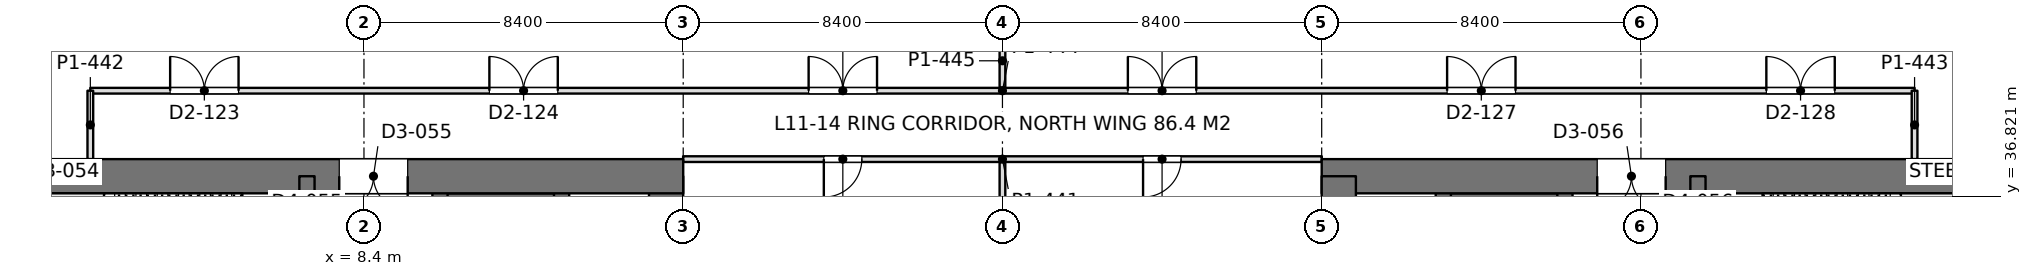
"""IFC4 building model, lengths in metres.
Left out: names, types, materials, properties, quantities, classifications, styles, units other than length and angle.
Written with IfcOpenShell. Run it as: python <this file> out.ifc"""

import sys

from ifc_helpers import new_model, si_unit, direction, frame, frame_2d, origin, place, context, subcontext, project, spatial, rectangle, extrude, element, fill, save


model = new_model("IFC4")
c1 = context("Model", 3, precision=1e-05, world=origin(), true_north=direction((0.0, 1.0)))
c2 = subcontext(c1, "Body", "Model", "MODEL_VIEW")
j1 = project(units=[si_unit("LENGTHUNIT", "METRE"), si_unit("PLANEANGLEUNIT", "RADIAN")], contexts=[c1])
p1 = place(None, origin())
s1 = spatial("IfcSite", under=j1, at=p1, CompositionType="ELEMENT")
p2 = place(p1, origin())
s2 = spatial("IfcBuilding", under=s1, at=p2, CompositionType="ELEMENT")
p3 = place(p2, frame((0.0, 0.0, 50.4)))
s3 = spatial("IfcBuildingStorey", under=s2, at=p3, CompositionType="ELEMENT", Elevation=50.4)
p4 = place(p3, frame((-1.2, 37.35, 0.0), z_axis=(0.0, 0.0, 1.0), x_axis=(1.0, 0.0, 0.0)))
e1 = element("IfcWall", 1, at=p4, inside=s3, PredefinedType="SHEAR", context=c2, shape_type="SweptSolid", body=[
    extrude(rectangle(XDim=18.0, YDim=0.9, at=frame_2d((9.0, 0.0))), origin(), (0.0, 0.0, 1.0), 4.5),
])
p5 = place(p4, frame((8.95, 0.0, 0.0)))
e2 = element("IfcOpeningElement", 2, at=p5, cuts=e1, PredefinedType="OPENING", context=c2, shape_type="SweptSolid", body=[
    extrude(rectangle(XDim=1.8, YDim=2.4, at=frame_2d((0.9, 1.2))), frame((0.0, 0.46, 0.0), z_axis=(0.0, -1.0, 0.0), x_axis=(1.0, 0.0, 0.0)), (0.0, 0.0, 1.0), 0.92),
])
p6 = place(p3, frame((16.35, 13.05, 0.0), z_axis=(0.0, 0.0, 1.0), x_axis=(0.0, 1.0, 0.0)))
e3 = element("IfcWall", 3, at=p6, inside=s3, PredefinedType="SHEAR", context=c2, shape_type="SweptSolid", body=[
    extrude(rectangle(XDim=24.3, YDim=0.9, at=frame_2d((12.15, 0.0))), origin(), (0.0, 0.0, 1.0), 4.5),
])
p7 = place(p3, frame((6.9, 13.05, 0.0), z_axis=(0.0, 0.0, 1.0), x_axis=(0.0, 1.0, 0.0)))
e4 = element("IfcWall", 4, at=p7, inside=s3, PredefinedType="SHEAR", context=c2, shape_type="SweptSolid", body=[
    extrude(rectangle(XDim=24.3, YDim=0.4, at=frame_2d((12.15, 0.0))), origin(), (0.0, 0.0, 1.0), 4.5),
])
p8 = place(p7, frame((1.3, 0.0, 0.0)))
e5 = element("IfcOpeningElement", 5, at=p8, cuts=e4, PredefinedType="OPENING", context=c2, shape_type="SweptSolid", body=[
    extrude(rectangle(XDim=1.0, YDim=2.2, at=frame_2d((0.5, 1.1))), frame((0.0, 0.21, 0.0), z_axis=(0.0, -1.0, 0.0), x_axis=(1.0, 0.0, 0.0)), (0.0, 0.0, 1.0), 0.42),
])
p9 = place(p7, frame((22.0, 0.0, 0.0)))
e6 = element("IfcOpeningElement", 6, at=p9, cuts=e4, PredefinedType="OPENING", context=c2, shape_type="SweptSolid", body=[
    extrude(rectangle(XDim=1.0, YDim=2.2, at=frame_2d((0.5, 1.1))), frame((0.0, 0.21, 0.0), z_axis=(0.0, -1.0, 0.0), x_axis=(1.0, 0.0, 0.0)), (0.0, 0.0, 1.0), 0.42),
])
p10 = place(p7, frame((5.55, 0.0, 0.0)))
e7 = element("IfcOpeningElement", 7, at=p10, cuts=e4, PredefinedType="OPENING", context=c2, shape_type="SweptSolid", body=[
    extrude(rectangle(XDim=1.0, YDim=2.2, at=frame_2d((0.5, 1.1))), frame((0.0, 0.21, 0.0), z_axis=(0.0, -1.0, 0.0), x_axis=(1.0, 0.0, 0.0)), (0.0, 0.0, 1.0), 0.42),
])
p11 = place(p7, frame((9.55, 0.0, 0.0)))
e8 = element("IfcOpeningElement", 8, at=p11, cuts=e4, PredefinedType="OPENING", context=c2, shape_type="SweptSolid", body=[
    extrude(rectangle(XDim=1.0, YDim=2.2, at=frame_2d((0.5, 1.1))), frame((0.0, 0.21, 0.0), z_axis=(0.0, -1.0, 0.0), x_axis=(1.0, 0.0, 0.0)), (0.0, 0.0, 1.0), 0.42),
])
p12 = place(p7, frame((12.8, 0.0, 0.0)))
e9 = element("IfcOpeningElement", 9, at=p12, cuts=e4, PredefinedType="OPENING", context=c2, shape_type="SweptSolid", body=[
    extrude(rectangle(XDim=1.1, YDim=2.2, at=frame_2d((0.55, 1.1))), frame((0.0, 0.21, 0.0), z_axis=(0.0, -1.0, 0.0), x_axis=(1.0, 0.0, 0.0)), (0.0, 0.0, 1.0), 0.42),
])
p13 = place(p7, frame((15.538, 0.0, 0.0)))
e10 = element("IfcOpeningElement", 10, at=p13, cuts=e4, PredefinedType="OPENING", context=c2, shape_type="SweptSolid", body=[
    extrude(rectangle(XDim=1.1, YDim=2.2, at=frame_2d((0.55, 1.1))), frame((0.0, 0.21, 0.0), z_axis=(0.0, -1.0, 0.0), x_axis=(1.0, 0.0, 0.0)), (0.0, 0.0, 1.0), 0.42),
])
p14 = place(p7, frame((18.262, 0.0, 0.0)))
e11 = element("IfcOpeningElement", 11, at=p14, cuts=e4, PredefinedType="OPENING", context=c2, shape_type="SweptSolid", body=[
    extrude(rectangle(XDim=1.1, YDim=2.2, at=frame_2d((0.55, 1.1))), frame((0.0, 0.21, 0.0), z_axis=(0.0, -1.0, 0.0), x_axis=(1.0, 0.0, 0.0)), (0.0, 0.0, 1.0), 0.42),
])
p15 = place(p3, frame((10.4, 13.05, 0.0), z_axis=(0.0, 0.0, 1.0), x_axis=(0.0, 1.0, 0.0)))
e12 = element("IfcWall", 12, at=p15, inside=s3, PredefinedType="SHEAR", context=c2, shape_type="SweptSolid", body=[
    extrude(rectangle(XDim=24.3, YDim=0.4, at=frame_2d((12.15, 0.0))), origin(), (0.0, 0.0, 1.0), 4.5),
])
p16 = place(p15, frame((1.5, 0.0, 0.0)))
e13 = element("IfcOpeningElement", 13, at=p16, cuts=e12, PredefinedType="OPENING", context=c2, shape_type="SweptSolid", body=[
    extrude(rectangle(XDim=1.1, YDim=2.2, at=frame_2d((0.55, 1.1))), frame((0.0, 0.21, 0.0), z_axis=(0.0, -1.0, 0.0), x_axis=(1.0, 0.0, 0.0)), (0.0, 0.0, 1.0), 0.42),
])
p17 = place(p15, frame((4.35, 0.0, 0.0)))
e14 = element("IfcOpeningElement", 14, at=p17, cuts=e12, PredefinedType="OPENING", context=c2, shape_type="SweptSolid", body=[
    extrude(rectangle(XDim=1.1, YDim=2.2, at=frame_2d((0.55, 1.1))), frame((0.0, 0.21, 0.0), z_axis=(0.0, -1.0, 0.0), x_axis=(1.0, 0.0, 0.0)), (0.0, 0.0, 1.0), 0.42),
])
p18 = place(p15, frame((7.2, 0.0, 0.0)))
e15 = element("IfcOpeningElement", 15, at=p18, cuts=e12, PredefinedType="OPENING", context=c2, shape_type="SweptSolid", body=[
    extrude(rectangle(XDim=1.1, YDim=2.2, at=frame_2d((0.55, 1.1))), frame((0.0, 0.21, 0.0), z_axis=(0.0, -1.0, 0.0), x_axis=(1.0, 0.0, 0.0)), (0.0, 0.0, 1.0), 0.42),
])
p19 = place(p15, frame((21.45, 0.0, 0.0)))
e16 = element("IfcOpeningElement", 16, at=p19, cuts=e12, PredefinedType="OPENING", context=c2, shape_type="SweptSolid", body=[
    extrude(rectangle(XDim=1.1, YDim=2.2, at=frame_2d((0.55, 1.1))), frame((0.0, 0.21, 0.0), z_axis=(0.0, -1.0, 0.0), x_axis=(1.0, 0.0, 0.0)), (0.0, 0.0, 1.0), 0.42),
])
p20 = place(p3, frame((13.6, 13.05, 0.0), z_axis=(0.0, 0.0, 1.0), x_axis=(0.0, 1.0, 0.0)))
e17 = element("IfcWall", 17, at=p20, inside=s3, PredefinedType="SHEAR", context=c2, shape_type="SweptSolid", body=[
    extrude(rectangle(XDim=24.3, YDim=0.4, at=frame_2d((12.15, 0.0))), origin(), (0.0, 0.0, 1.0), 4.5),
])
p21 = place(p3, frame((10.4, 36.625, 0.0), z_axis=(0.0, 0.0, 1.0), x_axis=(1.0, 0.0, 0.0)))
e18 = element("IfcWall", 18, at=p21, inside=s3, PredefinedType="SHEAR", context=c2, shape_type="SweptSolid", body=[
    extrude(rectangle(XDim=3.2, YDim=0.55, at=frame_2d((1.6, 0.0))), origin(), (0.0, 0.0, 1.0), 4.5),
])
p22 = place(p3, frame((33.6, 37.35, 0.0), z_axis=(0.0, 0.0, 1.0), x_axis=(1.0, 0.0, 0.0)))
e19 = element("IfcWall", 19, at=p22, inside=s3, PredefinedType="SHEAR", context=c2, shape_type="SweptSolid", body=[
    extrude(rectangle(XDim=18.0, YDim=0.9, at=frame_2d((9.0, 0.0))), origin(), (0.0, 0.0, 1.0), 4.5),
])
p23 = place(p22, frame((7.25, 0.0, 0.0)))
e20 = element("IfcOpeningElement", 20, at=p23, cuts=e19, PredefinedType="OPENING", context=c2, shape_type="SweptSolid", body=[
    extrude(rectangle(XDim=1.8, YDim=2.4, at=frame_2d((0.9, 1.2))), frame((0.0, 0.46, 0.0), z_axis=(0.0, -1.0, 0.0), x_axis=(1.0, 0.0, 0.0)), (0.0, 0.0, 1.0), 0.92),
])
p24 = place(p3, frame((34.05, 13.05, 0.0), z_axis=(0.0, 0.0, 1.0), x_axis=(0.0, 1.0, 0.0)))
e21 = element("IfcWall", 21, at=p24, inside=s3, PredefinedType="SHEAR", context=c2, shape_type="SweptSolid", body=[
    extrude(rectangle(XDim=24.3, YDim=0.9, at=frame_2d((12.15, 0.0))), origin(), (0.0, 0.0, 1.0), 4.5),
])
p25 = place(p3, frame((43.5, 13.05, 0.0), z_axis=(0.0, 0.0, 1.0), x_axis=(0.0, 1.0, 0.0)))
e22 = element("IfcWall", 22, at=p25, inside=s3, PredefinedType="SHEAR", context=c2, shape_type="SweptSolid", body=[
    extrude(rectangle(XDim=24.3, YDim=0.4, at=frame_2d((12.15, 0.0))), origin(), (0.0, 0.0, 1.0), 4.5),
])
p26 = place(p25, frame((1.3, 0.0, 0.0)))
e23 = element("IfcOpeningElement", 23, at=p26, cuts=e22, PredefinedType="OPENING", context=c2, shape_type="SweptSolid", body=[
    extrude(rectangle(XDim=1.0, YDim=2.2, at=frame_2d((0.5, 1.1))), frame((0.0, 0.21, 0.0), z_axis=(0.0, -1.0, 0.0), x_axis=(1.0, 0.0, 0.0)), (0.0, 0.0, 1.0), 0.42),
])
p27 = place(p25, frame((22.0, 0.0, 0.0)))
e24 = element("IfcOpeningElement", 24, at=p27, cuts=e22, PredefinedType="OPENING", context=c2, shape_type="SweptSolid", body=[
    extrude(rectangle(XDim=1.0, YDim=2.2, at=frame_2d((0.5, 1.1))), frame((0.0, 0.21, 0.0), z_axis=(0.0, -1.0, 0.0), x_axis=(1.0, 0.0, 0.0)), (0.0, 0.0, 1.0), 0.42),
])
p28 = place(p25, frame((5.55, 0.0, 0.0)))
e25 = element("IfcOpeningElement", 25, at=p28, cuts=e22, PredefinedType="OPENING", context=c2, shape_type="SweptSolid", body=[
    extrude(rectangle(XDim=1.0, YDim=2.2, at=frame_2d((0.5, 1.1))), frame((0.0, 0.21, 0.0), z_axis=(0.0, -1.0, 0.0), x_axis=(1.0, 0.0, 0.0)), (0.0, 0.0, 1.0), 0.42),
])
p29 = place(p25, frame((9.55, 0.0, 0.0)))
e26 = element("IfcOpeningElement", 26, at=p29, cuts=e22, PredefinedType="OPENING", context=c2, shape_type="SweptSolid", body=[
    extrude(rectangle(XDim=1.0, YDim=2.2, at=frame_2d((0.5, 1.1))), frame((0.0, 0.21, 0.0), z_axis=(0.0, -1.0, 0.0), x_axis=(1.0, 0.0, 0.0)), (0.0, 0.0, 1.0), 0.42),
])
p30 = place(p25, frame((12.8, 0.0, 0.0)))
e27 = element("IfcOpeningElement", 27, at=p30, cuts=e22, PredefinedType="OPENING", context=c2, shape_type="SweptSolid", body=[
    extrude(rectangle(XDim=1.1, YDim=2.2, at=frame_2d((0.55, 1.1))), frame((0.0, 0.21, 0.0), z_axis=(0.0, -1.0, 0.0), x_axis=(1.0, 0.0, 0.0)), (0.0, 0.0, 1.0), 0.42),
])
p31 = place(p25, frame((15.538, 0.0, 0.0)))
e28 = element("IfcOpeningElement", 28, at=p31, cuts=e22, PredefinedType="OPENING", context=c2, shape_type="SweptSolid", body=[
    extrude(rectangle(XDim=1.1, YDim=2.2, at=frame_2d((0.55, 1.1))), frame((0.0, 0.21, 0.0), z_axis=(0.0, -1.0, 0.0), x_axis=(1.0, 0.0, 0.0)), (0.0, 0.0, 1.0), 0.42),
])
p32 = place(p25, frame((18.262, 0.0, 0.0)))
e29 = element("IfcOpeningElement", 29, at=p32, cuts=e22, PredefinedType="OPENING", context=c2, shape_type="SweptSolid", body=[
    extrude(rectangle(XDim=1.1, YDim=2.2, at=frame_2d((0.55, 1.1))), frame((0.0, 0.21, 0.0), z_axis=(0.0, -1.0, 0.0), x_axis=(1.0, 0.0, 0.0)), (0.0, 0.0, 1.0), 0.42),
])
p33 = place(p3, frame((40.0, 13.05, 0.0), z_axis=(0.0, 0.0, 1.0), x_axis=(0.0, 1.0, 0.0)))
e30 = element("IfcWall", 30, at=p33, inside=s3, PredefinedType="SHEAR", context=c2, shape_type="SweptSolid", body=[
    extrude(rectangle(XDim=24.3, YDim=0.4, at=frame_2d((12.15, 0.0))), origin(), (0.0, 0.0, 1.0), 4.5),
])
p34 = place(p33, frame((1.5, 0.0, 0.0)))
e31 = element("IfcOpeningElement", 31, at=p34, cuts=e30, PredefinedType="OPENING", context=c2, shape_type="SweptSolid", body=[
    extrude(rectangle(XDim=1.1, YDim=2.2, at=frame_2d((0.55, 1.1))), frame((0.0, 0.21, 0.0), z_axis=(0.0, -1.0, 0.0), x_axis=(1.0, 0.0, 0.0)), (0.0, 0.0, 1.0), 0.42),
])
p35 = place(p33, frame((4.35, 0.0, 0.0)))
e32 = element("IfcOpeningElement", 32, at=p35, cuts=e30, PredefinedType="OPENING", context=c2, shape_type="SweptSolid", body=[
    extrude(rectangle(XDim=1.1, YDim=2.2, at=frame_2d((0.55, 1.1))), frame((0.0, 0.21, 0.0), z_axis=(0.0, -1.0, 0.0), x_axis=(1.0, 0.0, 0.0)), (0.0, 0.0, 1.0), 0.42),
])
p36 = place(p33, frame((7.2, 0.0, 0.0)))
e33 = element("IfcOpeningElement", 33, at=p36, cuts=e30, PredefinedType="OPENING", context=c2, shape_type="SweptSolid", body=[
    extrude(rectangle(XDim=1.1, YDim=2.2, at=frame_2d((0.55, 1.1))), frame((0.0, 0.21, 0.0), z_axis=(0.0, -1.0, 0.0), x_axis=(1.0, 0.0, 0.0)), (0.0, 0.0, 1.0), 0.42),
])
p37 = place(p33, frame((21.45, 0.0, 0.0)))
e34 = element("IfcOpeningElement", 34, at=p37, cuts=e30, PredefinedType="OPENING", context=c2, shape_type="SweptSolid", body=[
    extrude(rectangle(XDim=1.1, YDim=2.2, at=frame_2d((0.55, 1.1))), frame((0.0, 0.21, 0.0), z_axis=(0.0, -1.0, 0.0), x_axis=(1.0, 0.0, 0.0)), (0.0, 0.0, 1.0), 0.42),
])
p38 = place(p3, frame((36.8, 13.05, 0.0), z_axis=(0.0, 0.0, 1.0), x_axis=(0.0, 1.0, 0.0)))
e35 = element("IfcWall", 35, at=p38, inside=s3, PredefinedType="SHEAR", context=c2, shape_type="SweptSolid", body=[
    extrude(rectangle(XDim=24.3, YDim=0.4, at=frame_2d((12.15, 0.0))), origin(), (0.0, 0.0, 1.0), 4.5),
])
p39 = place(p3, frame((40.0, 36.625, 0.0), z_axis=(0.0, 0.0, 1.0), x_axis=(-1.0, 0.0, 0.0)))
e36 = element("IfcWall", 36, at=p39, inside=s3, PredefinedType="SHEAR", context=c2, shape_type="SweptSolid", body=[
    extrude(rectangle(XDim=3.2, YDim=0.55, at=frame_2d((1.6, 0.0))), origin(), (0.0, 0.0, 1.0), 4.5),
])
p40 = place(p3, frame((25.2, 39.674, 0.0), z_axis=(0.0, 0.0, 1.0), x_axis=(0.0, 1.0, 0.0)))
e37 = element("IfcWall", 37, at=p40, inside=s3, PredefinedType="PARTITIONING", context=c2, shape_type="SweptSolid", body=[
    extrude(rectangle(XDim=1.427, YDim=0.15, at=frame_2d((0.713, 0.0))), origin(), (0.0, 0.0, 1.0), 3.74),
])
p41 = place(p3, frame((1.2, 39.6, 0.0), z_axis=(0.0, 0.0, 1.0), x_axis=(1.0, 0.0, 0.0)))
e38 = element("IfcWall", 38, at=p41, inside=s3, PredefinedType="PARTITIONING", context=c2, shape_type="SweptSolid", body=[
    extrude(rectangle(XDim=48.0, YDim=0.15, at=frame_2d((24.0, 0.0))), origin(), (0.0, 0.0, 1.0), 3.74),
])
p42 = place(p41, frame((2.1, 0.0, 0.0)))
e39 = element("IfcOpeningElement", 39, at=p42, cuts=e38, PredefinedType="OPENING", context=c2, shape_type="SweptSolid", body=[
    extrude(rectangle(XDim=1.8, YDim=2.2, at=frame_2d((0.9, 1.1))), frame((0.0, 0.085, 0.0), z_axis=(0.0, -1.0, 0.0), x_axis=(1.0, 0.0, 0.0)), (0.0, 0.0, 1.0), 0.17),
])
p43 = place(p41, frame((10.5, 0.0, 0.0)))
e40 = element("IfcOpeningElement", 40, at=p43, cuts=e38, PredefinedType="OPENING", context=c2, shape_type="SweptSolid", body=[
    extrude(rectangle(XDim=1.8, YDim=2.2, at=frame_2d((0.9, 1.1))), frame((0.0, 0.085, 0.0), z_axis=(0.0, -1.0, 0.0), x_axis=(1.0, 0.0, 0.0)), (0.0, 0.0, 1.0), 0.17),
])
p44 = place(p41, frame((18.9, 0.0, 0.0)))
e41 = element("IfcOpeningElement", 41, at=p44, cuts=e38, PredefinedType="OPENING", context=c2, shape_type="SweptSolid", body=[
    extrude(rectangle(XDim=1.8, YDim=2.2, at=frame_2d((0.9, 1.1))), frame((0.0, 0.085, 0.0), z_axis=(0.0, -1.0, 0.0), x_axis=(1.0, 0.0, 0.0)), (0.0, 0.0, 1.0), 0.17),
])
p45 = place(p41, frame((27.3, 0.0, 0.0)))
e42 = element("IfcOpeningElement", 42, at=p45, cuts=e38, PredefinedType="OPENING", context=c2, shape_type="SweptSolid", body=[
    extrude(rectangle(XDim=1.8, YDim=2.2, at=frame_2d((0.9, 1.1))), frame((0.0, 0.085, 0.0), z_axis=(0.0, -1.0, 0.0), x_axis=(1.0, 0.0, 0.0)), (0.0, 0.0, 1.0), 0.17),
])
p46 = place(p41, frame((35.7, 0.0, 0.0)))
e43 = element("IfcOpeningElement", 43, at=p46, cuts=e38, PredefinedType="OPENING", context=c2, shape_type="SweptSolid", body=[
    extrude(rectangle(XDim=1.8, YDim=2.2, at=frame_2d((0.9, 1.1))), frame((0.0, 0.085, 0.0), z_axis=(0.0, -1.0, 0.0), x_axis=(1.0, 0.0, 0.0)), (0.0, 0.0, 1.0), 0.17),
])
p47 = place(p41, frame((44.1, 0.0, 0.0)))
e44 = element("IfcOpeningElement", 44, at=p47, cuts=e38, PredefinedType="OPENING", context=c2, shape_type="SweptSolid", body=[
    extrude(rectangle(XDim=1.8, YDim=2.2, at=frame_2d((0.9, 1.1))), frame((0.0, 0.085, 0.0), z_axis=(0.0, -1.0, 0.0), x_axis=(1.0, 0.0, 0.0)), (0.0, 0.0, 1.0), 0.17),
])
for number, where, z_axis, x_axis in (
    (45, (1.2, 37.8, 0.0), (0.0, 0.0, 1.0), (0.0, 1.0, 0.0)),
    (46, (49.2, 37.8, 0.0), (0.0, 0.0, 1.0), (0.0, 1.0, 0.0)),
):
    element("IfcWall", number, at=place(p3, frame(where, z_axis=z_axis, x_axis=x_axis)), inside=s3, PredefinedType="PARTITIONING", context=c2, shape_type="SweptSolid", body=[
        extrude(rectangle(XDim=1.8, YDim=0.15, at=frame_2d((0.9, 0.0))), origin(), (0.0, 0.0, 1.0), 4.34),
    ])
p48 = place(p3, frame((16.798, 37.8, 0.0), z_axis=(0.0, 0.0, 1.0), x_axis=(1.0, 0.0, 0.0)))
e47 = element("IfcWall", 47, at=p48, inside=s3, PredefinedType="PARTITIONING", context=c2, shape_type="SweptSolid", body=[
    extrude(rectangle(XDim=16.804, YDim=0.15, at=frame_2d((8.402, 0.0))), origin(), (0.0, 0.0, 1.0), 3.74),
])
p49 = place(p48, frame((3.702, 0.0, 0.0)))
e48 = element("IfcOpeningElement", 48, at=p49, cuts=e47, PredefinedType="OPENING", context=c2, shape_type="SweptSolid", body=[
    extrude(rectangle(XDim=1.0, YDim=2.2, at=frame_2d((0.5, 1.1))), frame((0.0, 0.085, 0.0), z_axis=(0.0, -1.0, 0.0), x_axis=(1.0, 0.0, 0.0)), (0.0, 0.0, 1.0), 0.17),
])
p50 = place(p48, frame((12.102, 0.0, 0.0)))
e49 = element("IfcOpeningElement", 49, at=p50, cuts=e47, PredefinedType="OPENING", context=c2, shape_type="SweptSolid", body=[
    extrude(rectangle(XDim=1.0, YDim=2.2, at=frame_2d((0.5, 1.1))), frame((0.0, 0.085, 0.0), z_axis=(0.0, -1.0, 0.0), x_axis=(1.0, 0.0, 0.0)), (0.0, 0.0, 1.0), 0.17),
])
p51 = place(p3, frame((25.2, 34.199, 0.0), z_axis=(0.0, 0.0, 1.0), x_axis=(0.0, 1.0, 0.0)))
e50 = element("IfcWall", 50, at=p51, inside=s3, PredefinedType="PARTITIONING", context=c2, shape_type="SweptSolid", body=[
    extrude(rectangle(XDim=3.527, YDim=0.15, at=frame_2d((1.764, 0.0))), origin(), (0.0, 0.0, 1.0), 3.74),
])
p52 = place(p5, frame((1.8, 0.0, 0.0), z_axis=(0.0, 0.0, 1.0), x_axis=(-1.0, 0.0, 0.0)))
e51 = element("IfcDoor", 51, at=p52, inside=s3, OperationType="DOUBLE_DOOR_SINGLE_SWING", PredefinedType="DOOR", context=c2, shape_type="SweptSolid", body=[
    extrude(rectangle(XDim=1.8, YDim=2.4, at=frame_2d((0.9, 1.2))), frame((0.0, 0.025, 0.0), z_axis=(0.0, -1.0, 0.0), x_axis=(1.0, 0.0, 0.0)), (0.0, 0.0, 1.0), 0.05),
])
fill(e2, e51)
p53 = place(p23, frame((1.8, 0.0, 0.0), z_axis=(0.0, 0.0, 1.0), x_axis=(-1.0, 0.0, 0.0)))
e52 = element("IfcDoor", 52, at=p53, inside=s3, OperationType="DOUBLE_DOOR_SINGLE_SWING", PredefinedType="DOOR", context=c2, shape_type="SweptSolid", body=[
    extrude(rectangle(XDim=1.8, YDim=2.4, at=frame_2d((0.9, 1.2))), frame((0.0, 0.025, 0.0), z_axis=(0.0, -1.0, 0.0), x_axis=(1.0, 0.0, 0.0)), (0.0, 0.0, 1.0), 0.05),
])
fill(e20, e52)
p54 = place(p42, origin())
e53 = element("IfcDoor", 53, at=p54, inside=s3, OperationType="DOUBLE_DOOR_SINGLE_SWING", PredefinedType="DOOR", context=c2, shape_type="SweptSolid", body=[
    extrude(rectangle(XDim=1.8, YDim=2.2, at=frame_2d((0.9, 1.1))), frame((0.0, 0.025, 0.0), z_axis=(0.0, -1.0, 0.0), x_axis=(1.0, 0.0, 0.0)), (0.0, 0.0, 1.0), 0.05),
])
fill(e39, e53)
p55 = place(p43, origin())
e54 = element("IfcDoor", 54, at=p55, inside=s3, OperationType="DOUBLE_DOOR_SINGLE_SWING", PredefinedType="DOOR", context=c2, shape_type="SweptSolid", body=[
    extrude(rectangle(XDim=1.8, YDim=2.2, at=frame_2d((0.9, 1.1))), frame((0.0, 0.025, 0.0), z_axis=(0.0, -1.0, 0.0), x_axis=(1.0, 0.0, 0.0)), (0.0, 0.0, 1.0), 0.05),
])
fill(e40, e54)
p56 = place(p44, origin())
e55 = element("IfcDoor", 55, at=p56, inside=s3, OperationType="DOUBLE_DOOR_SINGLE_SWING", PredefinedType="DOOR", context=c2, shape_type="SweptSolid", body=[
    extrude(rectangle(XDim=1.8, YDim=2.2, at=frame_2d((0.9, 1.1))), frame((0.0, 0.025, 0.0), z_axis=(0.0, -1.0, 0.0), x_axis=(1.0, 0.0, 0.0)), (0.0, 0.0, 1.0), 0.05),
])
fill(e41, e55)
p57 = place(p45, origin())
e56 = element("IfcDoor", 56, at=p57, inside=s3, OperationType="DOUBLE_DOOR_SINGLE_SWING", PredefinedType="DOOR", context=c2, shape_type="SweptSolid", body=[
    extrude(rectangle(XDim=1.8, YDim=2.2, at=frame_2d((0.9, 1.1))), frame((0.0, 0.025, 0.0), z_axis=(0.0, -1.0, 0.0), x_axis=(1.0, 0.0, 0.0)), (0.0, 0.0, 1.0), 0.05),
])
fill(e42, e56)
p58 = place(p46, origin())
e57 = element("IfcDoor", 57, at=p58, inside=s3, OperationType="DOUBLE_DOOR_SINGLE_SWING", PredefinedType="DOOR", context=c2, shape_type="SweptSolid", body=[
    extrude(rectangle(XDim=1.8, YDim=2.2, at=frame_2d((0.9, 1.1))), frame((0.0, 0.025, 0.0), z_axis=(0.0, -1.0, 0.0), x_axis=(1.0, 0.0, 0.0)), (0.0, 0.0, 1.0), 0.05),
])
fill(e43, e57)
p59 = place(p47, origin())
e58 = element("IfcDoor", 58, at=p59, inside=s3, OperationType="DOUBLE_DOOR_SINGLE_SWING", PredefinedType="DOOR", context=c2, shape_type="SweptSolid", body=[
    extrude(rectangle(XDim=1.8, YDim=2.2, at=frame_2d((0.9, 1.1))), frame((0.0, 0.025, 0.0), z_axis=(0.0, -1.0, 0.0), x_axis=(1.0, 0.0, 0.0)), (0.0, 0.0, 1.0), 0.05),
])
fill(e44, e58)
p60 = place(p49, frame((1.0, 0.0, 0.0), z_axis=(0.0, 0.0, 1.0), x_axis=(-1.0, 0.0, 0.0)))
e59 = element("IfcDoor", 59, at=p60, inside=s3, OperationType="SINGLE_SWING_RIGHT", PredefinedType="DOOR", context=c2, shape_type="SweptSolid", body=[
    extrude(rectangle(XDim=1.0, YDim=2.2, at=frame_2d((0.5, 1.1))), frame((0.0, 0.025, 0.0), z_axis=(0.0, -1.0, 0.0), x_axis=(1.0, 0.0, 0.0)), (0.0, 0.0, 1.0), 0.05),
])
fill(e48, e59)
p61 = place(p50, frame((1.0, 0.0, 0.0), z_axis=(0.0, 0.0, 1.0), x_axis=(-1.0, 0.0, 0.0)))
e60 = element("IfcDoor", 60, at=p61, inside=s3, OperationType="SINGLE_SWING_RIGHT", PredefinedType="DOOR", context=c2, shape_type="SweptSolid", body=[
    extrude(rectangle(XDim=1.0, YDim=2.2, at=frame_2d((0.5, 1.1))), frame((0.0, 0.025, 0.0), z_axis=(0.0, -1.0, 0.0), x_axis=(1.0, 0.0, 0.0)), (0.0, 0.0, 1.0), 0.05),
])
fill(e49, e60)
save(model, sys.argv[1])
